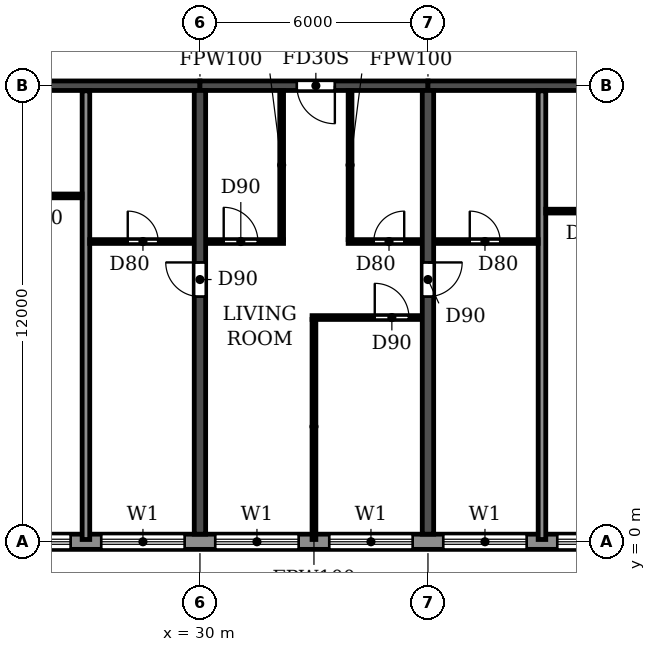
"""IFC4 building model, lengths in metres.
Left out: names, types, materials, properties, quantities, classifications, styles, units other than length and angle.
Written with IfcOpenShell. Run it as: python <this file> out.ifc"""

import sys

from ifc_helpers import new_model, si_unit, direction, frame, frame_2d, origin, place, context, subcontext, project, spatial, rectangle, extrude, element, fill, save


model = new_model("IFC4")
c1 = context("Model", 3, precision=1e-05, world=origin(), true_north=direction((0.0, 1.0)))
c2 = subcontext(c1, "Body", "Model", "MODEL_VIEW")
j1 = project(units=[si_unit("LENGTHUNIT", "METRE"), si_unit("PLANEANGLEUNIT", "RADIAN")], contexts=[c1])
p1 = place(None, origin())
s1 = spatial("IfcSite", under=j1, at=p1, CompositionType="ELEMENT")
p2 = place(p1, origin())
s2 = spatial("IfcBuilding", under=s1, at=p2, CompositionType="ELEMENT")
p3 = place(p2, frame((0.0, 0.0, 142.2)))
s3 = spatial("IfcBuildingStorey", under=s2, at=p3, CompositionType="ELEMENT", Elevation=142.2)
p4 = place(p3, frame((30.0, 0.2, 0.0), z_axis=(0.0, 0.0, 1.0), x_axis=(0.0, 1.0, 0.0)))
e1 = element("IfcWall", 1, at=p4, inside=s3, PredefinedType="SHEAR", context=c2, shape_type="SweptSolid", body=[
    extrude(rectangle(XDim=11.675, YDim=0.3, at=frame_2d((5.837, 0.0))), origin(), (0.0, 0.0, 1.0), 3.07),
])
p5 = place(p4, frame((6.25, 0.0, 0.0)))
e2 = element("IfcOpeningElement", 2, at=p5, cuts=e1, PredefinedType="OPENING", context=c2, shape_type="SweptSolid", body=[
    extrude(rectangle(XDim=0.9, YDim=2.1, at=frame_2d((0.45, 1.05))), frame((0.0, 0.16, 0.0), z_axis=(0.0, -1.0, 0.0), x_axis=(1.0, 0.0, 0.0)), (0.0, 0.0, 1.0), 0.32),
])
p6 = place(p3, frame((36.0, 0.2, 0.0), z_axis=(0.0, 0.0, 1.0), x_axis=(0.0, 1.0, 0.0)))
e3 = element("IfcWall", 3, at=p6, inside=s3, PredefinedType="SHEAR", context=c2, shape_type="SweptSolid", body=[
    extrude(rectangle(XDim=11.675, YDim=0.3, at=frame_2d((5.837, 0.0))), origin(), (0.0, 0.0, 1.0), 3.07),
])
p7 = place(p6, frame((6.25, 0.0, 0.0)))
e4 = element("IfcOpeningElement", 4, at=p7, cuts=e3, PredefinedType="OPENING", context=c2, shape_type="SweptSolid", body=[
    extrude(rectangle(XDim=0.9, YDim=2.1, at=frame_2d((0.45, 1.05))), frame((0.0, 0.16, 0.0), z_axis=(0.0, -1.0, 0.0), x_axis=(1.0, 0.0, 0.0)), (0.0, 0.0, 1.0), 0.32),
])
p8 = place(p3, frame((24.0, 12.0, 0.0), z_axis=(0.0, 0.0, 1.0), x_axis=(1.0, 0.0, 0.0)))
e5 = element("IfcWall", 5, at=p8, inside=s3, PredefinedType="SHEAR", context=c2, shape_type="SweptSolid", body=[
    extrude(rectangle(XDim=6.0, YDim=0.25, at=frame_2d((3.0, 0.0))), origin(), (0.0, 0.0, 1.0), 2.47),
])
p9 = place(p3, frame((30.0, 12.0, 0.0), z_axis=(0.0, 0.0, 1.0), x_axis=(1.0, 0.0, 0.0)))
e6 = element("IfcWall", 6, at=p9, inside=s3, PredefinedType="SHEAR", context=c2, shape_type="SweptSolid", body=[
    extrude(rectangle(XDim=6.0, YDim=0.25, at=frame_2d((3.0, 0.0))), origin(), (0.0, 0.0, 1.0), 2.47),
])
p10 = place(p9, frame((2.55, 0.0, 0.0)))
e7 = element("IfcOpeningElement", 7, at=p10, cuts=e6, PredefinedType="OPENING", context=c2, shape_type="SweptSolid", body=[
    extrude(rectangle(XDim=1.0, YDim=2.1, at=frame_2d((0.5, 1.05))), frame((0.0, 0.135, 0.0), z_axis=(0.0, -1.0, 0.0), x_axis=(1.0, 0.0, 0.0)), (0.0, 0.0, 1.0), 0.27),
])
p11 = place(p3, frame((36.0, 12.0, 0.0), z_axis=(0.0, 0.0, 1.0), x_axis=(1.0, 0.0, 0.0)))
e8 = element("IfcWall", 8, at=p11, inside=s3, PredefinedType="SHEAR", context=c2, shape_type="SweptSolid", body=[
    extrude(rectangle(XDim=6.0, YDim=0.25, at=frame_2d((3.0, 0.0))), origin(), (0.0, 0.0, 1.0), 2.47),
])
p12 = place(p3, frame((16.683, 0.0, 0.0), z_axis=(0.0, 0.0, 1.0), x_axis=(1.0, 0.0, 0.0)))
e9 = element("IfcWall", 9, at=p12, inside=s3, PredefinedType="STANDARD", context=c2, shape_type="SweptSolid", body=[
    extrude(rectangle(XDim=68.634, YDim=0.4, at=frame_2d((34.317, 0.0))), origin(), (0.0, 0.0, 1.0), 3.07),
])
p13 = place(p12, frame((1.717, 0.0, 0.9)))
e10 = element("IfcOpeningElement", 10, at=p13, cuts=e9, PredefinedType="OPENING", context=c2, shape_type="SweptSolid", body=[
    extrude(rectangle(XDim=2.2, YDim=1.5, at=frame_2d((1.1, 0.75))), frame((0.0, 0.21, 0.0), z_axis=(0.0, -1.0, 0.0), x_axis=(1.0, 0.0, 0.0)), (0.0, 0.0, 1.0), 0.42),
])
p14 = place(p12, frame((4.717, 0.0, 0.9)))
e11 = element("IfcOpeningElement", 11, at=p14, cuts=e9, PredefinedType="OPENING", context=c2, shape_type="SweptSolid", body=[
    extrude(rectangle(XDim=2.2, YDim=1.5, at=frame_2d((1.1, 0.75))), frame((0.0, 0.21, 0.0), z_axis=(0.0, -1.0, 0.0), x_axis=(1.0, 0.0, 0.0)), (0.0, 0.0, 1.0), 0.42),
])
p15 = place(p12, frame((7.717, 0.0, 0.9)))
e12 = element("IfcOpeningElement", 12, at=p15, cuts=e9, PredefinedType="OPENING", context=c2, shape_type="SweptSolid", body=[
    extrude(rectangle(XDim=2.2, YDim=1.5, at=frame_2d((1.1, 0.75))), frame((0.0, 0.21, 0.0), z_axis=(0.0, -1.0, 0.0), x_axis=(1.0, 0.0, 0.0)), (0.0, 0.0, 1.0), 0.42),
])
p16 = place(p12, frame((10.717, 0.0, 0.9)))
e13 = element("IfcOpeningElement", 13, at=p16, cuts=e9, PredefinedType="OPENING", context=c2, shape_type="SweptSolid", body=[
    extrude(rectangle(XDim=2.2, YDim=1.5, at=frame_2d((1.1, 0.75))), frame((0.0, 0.21, 0.0), z_axis=(0.0, -1.0, 0.0), x_axis=(1.0, 0.0, 0.0)), (0.0, 0.0, 1.0), 0.42),
])
p17 = place(p12, frame((13.717, 0.0, 0.9)))
e14 = element("IfcOpeningElement", 14, at=p17, cuts=e9, PredefinedType="OPENING", context=c2, shape_type="SweptSolid", body=[
    extrude(rectangle(XDim=2.2, YDim=1.5, at=frame_2d((1.1, 0.75))), frame((0.0, 0.21, 0.0), z_axis=(0.0, -1.0, 0.0), x_axis=(1.0, 0.0, 0.0)), (0.0, 0.0, 1.0), 0.42),
])
p18 = place(p12, frame((16.717, 0.0, 0.9)))
e15 = element("IfcOpeningElement", 15, at=p18, cuts=e9, PredefinedType="OPENING", context=c2, shape_type="SweptSolid", body=[
    extrude(rectangle(XDim=2.2, YDim=1.5, at=frame_2d((1.1, 0.75))), frame((0.0, 0.21, 0.0), z_axis=(0.0, -1.0, 0.0), x_axis=(1.0, 0.0, 0.0)), (0.0, 0.0, 1.0), 0.42),
])
p19 = place(p12, frame((19.717, 0.0, 0.9)))
e16 = element("IfcOpeningElement", 16, at=p19, cuts=e9, PredefinedType="OPENING", context=c2, shape_type="SweptSolid", body=[
    extrude(rectangle(XDim=2.2, YDim=1.5, at=frame_2d((1.1, 0.75))), frame((0.0, 0.21, 0.0), z_axis=(0.0, -1.0, 0.0), x_axis=(1.0, 0.0, 0.0)), (0.0, 0.0, 1.0), 0.42),
])
p20 = place(p12, frame((22.717, 0.0, 0.9)))
e17 = element("IfcOpeningElement", 17, at=p20, cuts=e9, PredefinedType="OPENING", context=c2, shape_type="SweptSolid", body=[
    extrude(rectangle(XDim=2.2, YDim=1.5, at=frame_2d((1.1, 0.75))), frame((0.0, 0.21, 0.0), z_axis=(0.0, -1.0, 0.0), x_axis=(1.0, 0.0, 0.0)), (0.0, 0.0, 1.0), 0.42),
])
p21 = place(p12, frame((25.717, 0.0, 0.9)))
e18 = element("IfcOpeningElement", 18, at=p21, cuts=e9, PredefinedType="OPENING", context=c2, shape_type="SweptSolid", body=[
    extrude(rectangle(XDim=2.2, YDim=1.5, at=frame_2d((1.1, 0.75))), frame((0.0, 0.21, 0.0), z_axis=(0.0, -1.0, 0.0), x_axis=(1.0, 0.0, 0.0)), (0.0, 0.0, 1.0), 0.42),
])
p22 = place(p12, frame((28.717, 0.0, 0.9)))
e19 = element("IfcOpeningElement", 19, at=p22, cuts=e9, PredefinedType="OPENING", context=c2, shape_type="SweptSolid", body=[
    extrude(rectangle(XDim=2.2, YDim=1.5, at=frame_2d((1.1, 0.75))), frame((0.0, 0.21, 0.0), z_axis=(0.0, -1.0, 0.0), x_axis=(1.0, 0.0, 0.0)), (0.0, 0.0, 1.0), 0.42),
])
p23 = place(p12, frame((31.717, 0.0, 0.9)))
e20 = element("IfcOpeningElement", 20, at=p23, cuts=e9, PredefinedType="OPENING", context=c2, shape_type="SweptSolid", body=[
    extrude(rectangle(XDim=2.2, YDim=1.5, at=frame_2d((1.1, 0.75))), frame((0.0, 0.21, 0.0), z_axis=(0.0, -1.0, 0.0), x_axis=(1.0, 0.0, 0.0)), (0.0, 0.0, 1.0), 0.42),
])
p24 = place(p12, frame((34.917, 0.0, 0.0)))
e21 = element("IfcOpeningElement", 21, at=p24, cuts=e9, PredefinedType="OPENING", context=c2, shape_type="SweptSolid", body=[
    extrude(rectangle(XDim=1.8, YDim=2.4, at=frame_2d((0.9, 1.2))), frame((0.0, 0.21, 0.0), z_axis=(0.0, -1.0, 0.0), x_axis=(1.0, 0.0, 0.0)), (0.0, 0.0, 1.0), 0.42),
])
p25 = place(p12, frame((37.717, 0.0, 0.9)))
e22 = element("IfcOpeningElement", 22, at=p25, cuts=e9, PredefinedType="OPENING", context=c2, shape_type="SweptSolid", body=[
    extrude(rectangle(XDim=2.2, YDim=1.5, at=frame_2d((1.1, 0.75))), frame((0.0, 0.21, 0.0), z_axis=(0.0, -1.0, 0.0), x_axis=(1.0, 0.0, 0.0)), (0.0, 0.0, 1.0), 0.42),
])
p26 = place(p12, frame((40.717, 0.0, 0.9)))
e23 = element("IfcOpeningElement", 23, at=p26, cuts=e9, PredefinedType="OPENING", context=c2, shape_type="SweptSolid", body=[
    extrude(rectangle(XDim=2.2, YDim=1.5, at=frame_2d((1.1, 0.75))), frame((0.0, 0.21, 0.0), z_axis=(0.0, -1.0, 0.0), x_axis=(1.0, 0.0, 0.0)), (0.0, 0.0, 1.0), 0.42),
])
p27 = place(p12, frame((43.717, 0.0, 0.9)))
e24 = element("IfcOpeningElement", 24, at=p27, cuts=e9, PredefinedType="OPENING", context=c2, shape_type="SweptSolid", body=[
    extrude(rectangle(XDim=2.2, YDim=1.5, at=frame_2d((1.1, 0.75))), frame((0.0, 0.21, 0.0), z_axis=(0.0, -1.0, 0.0), x_axis=(1.0, 0.0, 0.0)), (0.0, 0.0, 1.0), 0.42),
])
p28 = place(p12, frame((46.917, 0.0, 0.0)))
e25 = element("IfcOpeningElement", 25, at=p28, cuts=e9, PredefinedType="OPENING", context=c2, shape_type="SweptSolid", body=[
    extrude(rectangle(XDim=1.8, YDim=2.4, at=frame_2d((0.9, 1.2))), frame((0.0, 0.21, 0.0), z_axis=(0.0, -1.0, 0.0), x_axis=(1.0, 0.0, 0.0)), (0.0, 0.0, 1.0), 0.42),
])
p29 = place(p12, frame((49.717, 0.0, 0.9)))
e26 = element("IfcOpeningElement", 26, at=p29, cuts=e9, PredefinedType="OPENING", context=c2, shape_type="SweptSolid", body=[
    extrude(rectangle(XDim=2.2, YDim=1.5, at=frame_2d((1.1, 0.75))), frame((0.0, 0.21, 0.0), z_axis=(0.0, -1.0, 0.0), x_axis=(1.0, 0.0, 0.0)), (0.0, 0.0, 1.0), 0.42),
])
p30 = place(p12, frame((52.717, 0.0, 0.9)))
e27 = element("IfcOpeningElement", 27, at=p30, cuts=e9, PredefinedType="OPENING", context=c2, shape_type="SweptSolid", body=[
    extrude(rectangle(XDim=2.2, YDim=1.5, at=frame_2d((1.1, 0.75))), frame((0.0, 0.21, 0.0), z_axis=(0.0, -1.0, 0.0), x_axis=(1.0, 0.0, 0.0)), (0.0, 0.0, 1.0), 0.42),
])
p31 = place(p12, frame((55.717, 0.0, 0.9)))
e28 = element("IfcOpeningElement", 28, at=p31, cuts=e9, PredefinedType="OPENING", context=c2, shape_type="SweptSolid", body=[
    extrude(rectangle(XDim=2.2, YDim=1.5, at=frame_2d((1.1, 0.75))), frame((0.0, 0.21, 0.0), z_axis=(0.0, -1.0, 0.0), x_axis=(1.0, 0.0, 0.0)), (0.0, 0.0, 1.0), 0.42),
])
p32 = place(p12, frame((58.717, 0.0, 0.9)))
e29 = element("IfcOpeningElement", 29, at=p32, cuts=e9, PredefinedType="OPENING", context=c2, shape_type="SweptSolid", body=[
    extrude(rectangle(XDim=2.2, YDim=1.5, at=frame_2d((1.1, 0.75))), frame((0.0, 0.21, 0.0), z_axis=(0.0, -1.0, 0.0), x_axis=(1.0, 0.0, 0.0)), (0.0, 0.0, 1.0), 0.42),
])
p33 = place(p12, frame((61.717, 0.0, 0.9)))
e30 = element("IfcOpeningElement", 30, at=p33, cuts=e9, PredefinedType="OPENING", context=c2, shape_type="SweptSolid", body=[
    extrude(rectangle(XDim=2.2, YDim=1.5, at=frame_2d((1.1, 0.75))), frame((0.0, 0.21, 0.0), z_axis=(0.0, -1.0, 0.0), x_axis=(1.0, 0.0, 0.0)), (0.0, 0.0, 1.0), 0.42),
])
p34 = place(p12, frame((64.717, 0.0, 0.9)))
e31 = element("IfcOpeningElement", 31, at=p34, cuts=e9, PredefinedType="OPENING", context=c2, shape_type="SweptSolid", body=[
    extrude(rectangle(XDim=2.2, YDim=1.5, at=frame_2d((1.1, 0.75))), frame((0.0, 0.21, 0.0), z_axis=(0.0, -1.0, 0.0), x_axis=(1.0, 0.0, 0.0)), (0.0, 0.0, 1.0), 0.42),
])
for number, where, z_axis, x_axis in (
    (32, (27.0, 0.06, 0.0), (0.0, 0.0, 1.0), (0.0, 1.0, 0.0)),
    (33, (39.0, 0.06, 0.0), (0.0, 0.0, 1.0), (0.0, 1.0, 0.0)),
):
    element("IfcWall", number, at=place(p3, frame(where, z_axis=z_axis, x_axis=x_axis)), inside=s3, PredefinedType="PARTITIONING", context=c2, shape_type="SweptSolid", body=[
        extrude(rectangle(XDim=11.805, YDim=0.2, at=frame_2d((5.902, 0.0))), origin(), (0.0, 0.0, 1.0), 3.07),
    ])
p35 = place(p3, frame((32.95, 5.9, 0.0), z_axis=(0.0, 0.0, 1.0), x_axis=(1.0, 0.0, 0.0)))
e34 = element("IfcWall", 34, at=p35, inside=s3, PredefinedType="PARTITIONING", context=c2, shape_type="SweptSolid", body=[
    extrude(rectangle(XDim=2.89, YDim=0.1, at=frame_2d((1.445, 0.0))), origin(), (0.0, 0.0, 1.0), 3.07),
])
p36 = place(p35, frame((1.65, 0.0, 0.0)))
e35 = element("IfcOpeningElement", 35, at=p36, cuts=e34, PredefinedType="OPENING", context=c2, shape_type="SweptSolid", body=[
    extrude(rectangle(XDim=0.9, YDim=2.1, at=frame_2d((0.45, 1.05))), frame((0.0, 0.06, 0.0), z_axis=(0.0, -1.0, 0.0), x_axis=(1.0, 0.0, 0.0)), (0.0, 0.0, 1.0), 0.12),
])
p37 = place(p3, frame((27.1, 7.9, 0.0), z_axis=(0.0, 0.0, 1.0), x_axis=(1.0, 0.0, 0.0)))
e36 = element("IfcWall", 36, at=p37, inside=s3, PredefinedType="PARTITIONING", context=c2, shape_type="SweptSolid", body=[
    extrude(rectangle(XDim=2.74, YDim=0.1, at=frame_2d((1.37, 0.0))), origin(), (0.0, 0.0, 1.0), 3.07),
])
p38 = place(p37, frame((1.0, 0.0, 0.0)))
e37 = element("IfcOpeningElement", 37, at=p38, cuts=e36, PredefinedType="OPENING", context=c2, shape_type="SweptSolid", body=[
    extrude(rectangle(XDim=0.8, YDim=2.1, at=frame_2d((0.4, 1.05))), frame((0.0, 0.06, 0.0), z_axis=(0.0, -1.0, 0.0), x_axis=(1.0, 0.0, 0.0)), (0.0, 0.0, 1.0), 0.12),
])
p39 = place(p3, frame((30.16, 7.9, 0.0), z_axis=(0.0, 0.0, 1.0), x_axis=(1.0, 0.0, 0.0)))
e38 = element("IfcWall", 38, at=p39, inside=s3, PredefinedType="PARTITIONING", context=c2, shape_type="SweptSolid", body=[
    extrude(rectangle(XDim=2.04, YDim=0.1, at=frame_2d((1.02, 0.0))), origin(), (0.0, 0.0, 1.0), 3.07),
])
p40 = place(p39, frame((0.465, 0.0, 0.0)))
e39 = element("IfcOpeningElement", 39, at=p40, cuts=e38, PredefinedType="OPENING", context=c2, shape_type="SweptSolid", body=[
    extrude(rectangle(XDim=0.9, YDim=2.1, at=frame_2d((0.45, 1.05))), frame((0.0, 0.06, 0.0), z_axis=(0.0, -1.0, 0.0), x_axis=(1.0, 0.0, 0.0)), (0.0, 0.0, 1.0), 0.12),
])
p41 = place(p3, frame((33.9, 7.9, 0.0), z_axis=(0.0, 0.0, 1.0), x_axis=(1.0, 0.0, 0.0)))
e40 = element("IfcWall", 40, at=p41, inside=s3, PredefinedType="PARTITIONING", context=c2, shape_type="SweptSolid", body=[
    extrude(rectangle(XDim=1.94, YDim=0.1, at=frame_2d((0.97, 0.0))), origin(), (0.0, 0.0, 1.0), 3.07),
])
p42 = place(p41, frame((0.675, 0.0, 0.0)))
e41 = element("IfcOpeningElement", 41, at=p42, cuts=e40, PredefinedType="OPENING", context=c2, shape_type="SweptSolid", body=[
    extrude(rectangle(XDim=0.8, YDim=2.1, at=frame_2d((0.4, 1.05))), frame((0.0, 0.06, 0.0), z_axis=(0.0, -1.0, 0.0), x_axis=(1.0, 0.0, 0.0)), (0.0, 0.0, 1.0), 0.12),
])
p43 = place(p3, frame((36.16, 7.9, 0.0), z_axis=(0.0, 0.0, 1.0), x_axis=(1.0, 0.0, 0.0)))
e42 = element("IfcWall", 42, at=p43, inside=s3, PredefinedType="PARTITIONING", context=c2, shape_type="SweptSolid", body=[
    extrude(rectangle(XDim=2.74, YDim=0.1, at=frame_2d((1.37, 0.0))), origin(), (0.0, 0.0, 1.0), 3.07),
])
p44 = place(p43, frame((0.94, 0.0, 0.0)))
e43 = element("IfcOpeningElement", 43, at=p44, cuts=e42, PredefinedType="OPENING", context=c2, shape_type="SweptSolid", body=[
    extrude(rectangle(XDim=0.8, YDim=2.1, at=frame_2d((0.4, 1.05))), frame((0.0, 0.06, 0.0), z_axis=(0.0, -1.0, 0.0), x_axis=(1.0, 0.0, 0.0)), (0.0, 0.0, 1.0), 0.12),
])
p45 = place(p3, frame((39.1, 8.7, 0.0), z_axis=(0.0, 0.0, 1.0), x_axis=(1.0, 0.0, 0.0)))
e44 = element("IfcWall", 44, at=p45, inside=s3, PredefinedType="PARTITIONING", context=c2, shape_type="SweptSolid", body=[
    extrude(rectangle(XDim=2.74, YDim=0.1, at=frame_2d((1.37, 0.0))), origin(), (0.0, 0.0, 1.0), 3.07),
])
p46 = place(p45, frame((1.0, 0.0, 0.0)))
e45 = element("IfcOpeningElement", 45, at=p46, cuts=e44, PredefinedType="OPENING", context=c2, shape_type="SweptSolid", body=[
    extrude(rectangle(XDim=0.8, YDim=2.1, at=frame_2d((0.4, 1.05))), frame((0.0, 0.06, 0.0), z_axis=(0.0, -1.0, 0.0), x_axis=(1.0, 0.0, 0.0)), (0.0, 0.0, 1.0), 0.12),
])
p47 = place(p3, frame((24.16, 9.1, 0.0), z_axis=(0.0, 0.0, 1.0), x_axis=(1.0, 0.0, 0.0)))
e46 = element("IfcWall", 46, at=p47, inside=s3, PredefinedType="PARTITIONING", context=c2, shape_type="SweptSolid", body=[
    extrude(rectangle(XDim=2.74, YDim=0.1, at=frame_2d((1.37, 0.0))), origin(), (0.0, 0.0, 1.0), 3.07),
])
p48 = place(p47, frame((0.94, 0.0, 0.0)))
e47 = element("IfcOpeningElement", 47, at=p48, cuts=e46, PredefinedType="OPENING", context=c2, shape_type="SweptSolid", body=[
    extrude(rectangle(XDim=0.8, YDim=2.1, at=frame_2d((0.4, 1.05))), frame((0.0, 0.06, 0.0), z_axis=(0.0, -1.0, 0.0), x_axis=(1.0, 0.0, 0.0)), (0.0, 0.0, 1.0), 0.12),
])
p49 = place(p3, frame((32.15, 7.95, 0.0), z_axis=(0.0, 0.0, 1.0), x_axis=(0.0, 1.0, 0.0)))
e48 = element("IfcWall", 48, at=p49, inside=s3, PredefinedType="PARTITIONING", context=c2, shape_type="SweptSolid", body=[
    extrude(rectangle(XDim=3.915, YDim=0.1, at=frame_2d((1.958, 0.0))), origin(), (0.0, 0.0, 1.0), 3.07),
])
p50 = place(p3, frame((33.0, 0.06, 0.0), z_axis=(0.0, 0.0, 1.0), x_axis=(0.0, 1.0, 0.0)))
e49 = element("IfcWall", 49, at=p50, inside=s3, PredefinedType="PARTITIONING", context=c2, shape_type="SweptSolid", body=[
    extrude(rectangle(XDim=5.79, YDim=0.1, at=frame_2d((2.895, 0.0))), origin(), (0.0, 0.0, 1.0), 3.07),
])
p51 = place(p3, frame((33.95, 7.95, 0.0), z_axis=(0.0, 0.0, 1.0), x_axis=(0.0, 1.0, 0.0)))
e50 = element("IfcWall", 50, at=p51, inside=s3, PredefinedType="PARTITIONING", context=c2, shape_type="SweptSolid", body=[
    extrude(rectangle(XDim=3.915, YDim=0.1, at=frame_2d((1.958, 0.0))), origin(), (0.0, 0.0, 1.0), 3.07),
])
p52 = place(p15, origin())
e51 = element("IfcWindow", 51, at=p52, inside=s3, PartitioningType="DOUBLE_PANEL_HORIZONTAL", PredefinedType="WINDOW", context=c2, shape_type="SweptSolid", body=[
    extrude(rectangle(XDim=2.2, YDim=1.5, at=frame_2d((1.1, 0.75))), frame((0.0, 0.03, 0.0), z_axis=(0.0, -1.0, 0.0), x_axis=(1.0, 0.0, 0.0)), (0.0, 0.0, 1.0), 0.06),
])
fill(e12, e51)
p53 = place(p16, origin())
e52 = element("IfcWindow", 52, at=p53, inside=s3, PartitioningType="DOUBLE_PANEL_HORIZONTAL", PredefinedType="WINDOW", context=c2, shape_type="SweptSolid", body=[
    extrude(rectangle(XDim=2.2, YDim=1.5, at=frame_2d((1.1, 0.75))), frame((0.0, 0.03, 0.0), z_axis=(0.0, -1.0, 0.0), x_axis=(1.0, 0.0, 0.0)), (0.0, 0.0, 1.0), 0.06),
])
fill(e13, e52)
p54 = place(p17, origin())
e53 = element("IfcWindow", 53, at=p54, inside=s3, PartitioningType="DOUBLE_PANEL_HORIZONTAL", PredefinedType="WINDOW", context=c2, shape_type="SweptSolid", body=[
    extrude(rectangle(XDim=2.2, YDim=1.5, at=frame_2d((1.1, 0.75))), frame((0.0, 0.03, 0.0), z_axis=(0.0, -1.0, 0.0), x_axis=(1.0, 0.0, 0.0)), (0.0, 0.0, 1.0), 0.06),
])
fill(e14, e53)
p55 = place(p18, origin())
e54 = element("IfcWindow", 54, at=p55, inside=s3, PartitioningType="DOUBLE_PANEL_HORIZONTAL", PredefinedType="WINDOW", context=c2, shape_type="SweptSolid", body=[
    extrude(rectangle(XDim=2.2, YDim=1.5, at=frame_2d((1.1, 0.75))), frame((0.0, 0.03, 0.0), z_axis=(0.0, -1.0, 0.0), x_axis=(1.0, 0.0, 0.0)), (0.0, 0.0, 1.0), 0.06),
])
fill(e15, e54)
p56 = place(p19, origin())
e55 = element("IfcWindow", 55, at=p56, inside=s3, PartitioningType="DOUBLE_PANEL_HORIZONTAL", PredefinedType="WINDOW", context=c2, shape_type="SweptSolid", body=[
    extrude(rectangle(XDim=2.2, YDim=1.5, at=frame_2d((1.1, 0.75))), frame((0.0, 0.03, 0.0), z_axis=(0.0, -1.0, 0.0), x_axis=(1.0, 0.0, 0.0)), (0.0, 0.0, 1.0), 0.06),
])
fill(e16, e55)
p57 = place(p20, origin())
e56 = element("IfcWindow", 56, at=p57, inside=s3, PartitioningType="DOUBLE_PANEL_HORIZONTAL", PredefinedType="WINDOW", context=c2, shape_type="SweptSolid", body=[
    extrude(rectangle(XDim=2.2, YDim=1.5, at=frame_2d((1.1, 0.75))), frame((0.0, 0.03, 0.0), z_axis=(0.0, -1.0, 0.0), x_axis=(1.0, 0.0, 0.0)), (0.0, 0.0, 1.0), 0.06),
])
fill(e17, e56)
p58 = place(p38, origin())
e57 = element("IfcDoor", 57, at=p58, inside=s3, OperationType="SINGLE_SWING_LEFT", PredefinedType="DOOR", context=c2, shape_type="SweptSolid", body=[
    extrude(rectangle(XDim=0.8, YDim=2.1, at=frame_2d((0.4, 1.05))), frame((0.0, 0.025, 0.0), z_axis=(0.0, -1.0, 0.0), x_axis=(1.0, 0.0, 0.0)), (0.0, 0.0, 1.0), 0.05),
])
fill(e37, e57)
p59 = place(p44, origin())
e58 = element("IfcDoor", 58, at=p59, inside=s3, OperationType="SINGLE_SWING_LEFT", PredefinedType="DOOR", context=c2, shape_type="SweptSolid", body=[
    extrude(rectangle(XDim=0.8, YDim=2.1, at=frame_2d((0.4, 1.05))), frame((0.0, 0.025, 0.0), z_axis=(0.0, -1.0, 0.0), x_axis=(1.0, 0.0, 0.0)), (0.0, 0.0, 1.0), 0.05),
])
fill(e43, e58)
p60 = place(p5, origin())
e59 = element("IfcDoor", 59, at=p60, inside=s3, OperationType="SINGLE_SWING_RIGHT", PredefinedType="DOOR", context=c2, shape_type="SweptSolid", body=[
    extrude(rectangle(XDim=0.9, YDim=2.1, at=frame_2d((0.45, 1.05))), frame((0.0, 0.025, 0.0), z_axis=(0.0, -1.0, 0.0), x_axis=(1.0, 0.0, 0.0)), (0.0, 0.0, 1.0), 0.05),
])
fill(e2, e59)
p61 = place(p40, origin())
e60 = element("IfcDoor", 60, at=p61, inside=s3, OperationType="SINGLE_SWING_LEFT", PredefinedType="DOOR", context=c2, shape_type="SweptSolid", body=[
    extrude(rectangle(XDim=0.9, YDim=2.1, at=frame_2d((0.45, 1.05))), frame((0.0, 0.025, 0.0), z_axis=(0.0, -1.0, 0.0), x_axis=(1.0, 0.0, 0.0)), (0.0, 0.0, 1.0), 0.05),
])
fill(e39, e60)
p62 = place(p10, frame((1.0, 0.0, 0.0), z_axis=(0.0, 0.0, 1.0), x_axis=(-1.0, 0.0, 0.0)))
e61 = element("IfcDoor", 61, at=p62, inside=s3, OperationType="SINGLE_SWING_LEFT", PredefinedType="DOOR", context=c2, shape_type="SweptSolid", body=[
    extrude(rectangle(XDim=1.0, YDim=2.1, at=frame_2d((0.5, 1.05))), frame((0.0, 0.025, 0.0), z_axis=(0.0, -1.0, 0.0), x_axis=(1.0, 0.0, 0.0)), (0.0, 0.0, 1.0), 0.05),
])
fill(e7, e61)
p63 = place(p42, origin())
e62 = element("IfcDoor", 62, at=p63, inside=s3, OperationType="SINGLE_SWING_RIGHT", PredefinedType="DOOR", context=c2, shape_type="SweptSolid", body=[
    extrude(rectangle(XDim=0.8, YDim=2.1, at=frame_2d((0.4, 1.05))), frame((0.0, 0.025, 0.0), z_axis=(0.0, -1.0, 0.0), x_axis=(1.0, 0.0, 0.0)), (0.0, 0.0, 1.0), 0.05),
])
fill(e41, e62)
p64 = place(p36, origin())
e63 = element("IfcDoor", 63, at=p64, inside=s3, OperationType="SINGLE_SWING_LEFT", PredefinedType="DOOR", context=c2, shape_type="SweptSolid", body=[
    extrude(rectangle(XDim=0.9, YDim=2.1, at=frame_2d((0.45, 1.05))), frame((0.0, 0.025, 0.0), z_axis=(0.0, -1.0, 0.0), x_axis=(1.0, 0.0, 0.0)), (0.0, 0.0, 1.0), 0.05),
])
fill(e35, e63)
p65 = place(p7, frame((0.9, 0.0, 0.0), z_axis=(0.0, 0.0, 1.0), x_axis=(-1.0, 0.0, 0.0)))
e64 = element("IfcDoor", 64, at=p65, inside=s3, OperationType="SINGLE_SWING_LEFT", PredefinedType="DOOR", context=c2, shape_type="SweptSolid", body=[
    extrude(rectangle(XDim=0.9, YDim=2.1, at=frame_2d((0.45, 1.05))), frame((0.0, 0.025, 0.0), z_axis=(0.0, -1.0, 0.0), x_axis=(1.0, 0.0, 0.0)), (0.0, 0.0, 1.0), 0.05),
])
fill(e4, e64)
save(model, sys.argv[1])
